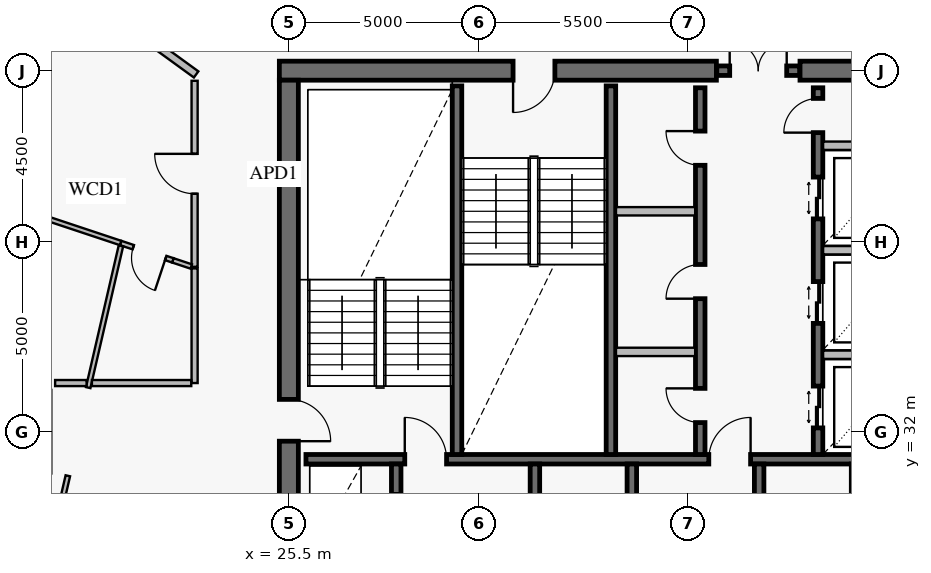
"""IFC4 building model, lengths in metres.
Left out: names, types, materials, properties, quantities, classifications, styles, units other than length and angle.
Written with IfcOpenShell. Run it as: python <this file> out.ifc"""

import sys

from ifc_helpers import new_model, si_unit, direction, frame, frame_2d, origin, place, context, subcontext, project, spatial, rectangle, extrude, element, fill, save


model = new_model("IFC4")
c1 = context("Model", 3, precision=1e-05, world=origin(), true_north=direction((0.0, 1.0)))
c2 = subcontext(c1, "Body", "Model", "MODEL_VIEW")
j1 = project(units=[si_unit("LENGTHUNIT", "METRE"), si_unit("PLANEANGLEUNIT", "RADIAN")], contexts=[c1])
p1 = place(None, origin())
s1 = spatial("IfcSite", under=j1, at=p1, CompositionType="ELEMENT")
p2 = place(p1, origin())
s2 = spatial("IfcBuilding", under=s1, at=p2, CompositionType="ELEMENT")
p3 = place(p2, frame((0.0, 0.0, 308.2)))
s3 = spatial("IfcBuildingStorey", under=s2, at=p3, CompositionType="ELEMENT", Elevation=308.2)
p4 = place(p3, frame((46.75, 41.5, 0.0), z_axis=(0.0, 0.0, 1.0), x_axis=(-1.0, 0.0, 0.0)))
e1 = element("IfcWall", 1, at=p4, inside=s3, PredefinedType="SHEAR", context=c2, shape_type="SweptSolid", body=[
    extrude(rectangle(XDim=7.8, YDim=0.5, at=frame_2d((3.9, 0.0))), origin(), (0.0, 0.0, 1.0), 3.8),
])
p5 = place(p3, frame((36.75, 41.5, 0.0), z_axis=(0.0, 0.0, 1.0), x_axis=(-1.0, 0.0, 0.0)))
e2 = element("IfcWall", 2, at=p5, inside=s3, PredefinedType="SHEAR", context=c2, shape_type="SweptSolid", body=[
    extrude(rectangle(XDim=11.5, YDim=0.5, at=frame_2d((5.75, 0.0))), origin(), (0.0, 0.0, 1.0), 3.8),
])
p6 = place(p5, frame((4.25, 0.0, 0.0)))
e3 = element("IfcOpeningElement", 3, at=p6, cuts=e2, PredefinedType="OPENING", context=c2, shape_type="SweptSolid", body=[
    extrude(rectangle(XDim=1.1, YDim=2.15, at=frame_2d((0.55, 1.075))), frame((0.0, 0.262, 0.0), z_axis=(0.0, -1.0, 0.0), x_axis=(1.0, 0.0, 0.0)), (0.0, 0.0, 1.0), 0.524),
])
p7 = place(p3, frame((25.5, 22.75, 0.0), z_axis=(0.0, 0.0, 1.0), x_axis=(0.0, 1.0, 0.0)))
e4 = element("IfcWall", 4, at=p7, inside=s3, PredefinedType="SHEAR", context=c2, shape_type="SweptSolid", body=[
    extrude(rectangle(XDim=18.5, YDim=0.5, at=frame_2d((9.25, 0.0))), origin(), (0.0, 0.0, 1.0), 3.8),
])
p8 = place(p7, frame((9.0, 0.0, 0.0)))
e5 = element("IfcOpeningElement", 5, at=p8, cuts=e4, PredefinedType="OPENING", context=c2, shape_type="SweptSolid", body=[
    extrude(rectangle(XDim=1.1, YDim=2.15, at=frame_2d((0.55, 1.075))), frame((0.0, 0.262, 0.0), z_axis=(0.0, -1.0, 0.0), x_axis=(1.0, 0.0, 0.0)), (0.0, 0.0, 1.0), 0.524),
])
p9 = place(p3, frame((36.76, 41.5, 0.0), z_axis=(0.0, 0.0, 1.0), x_axis=(1.0, 0.0, 0.0)))
e6 = element("IfcWall", 6, at=p9, inside=s3, PredefinedType="SOLIDWALL", context=c2, shape_type="SweptSolid", body=[
    extrude(rectangle(XDim=2.18, YDim=0.25, at=frame_2d((1.09, 0.0))), origin(), (0.0, 0.0, 1.0), 3.8),
])
p10 = place(p9, frame((0.34, 0.0, 0.0)))
e7 = element("IfcOpeningElement", 7, at=p10, cuts=e6, PredefinedType="OPENING", context=c2, shape_type="SweptSolid", body=[
    extrude(rectangle(XDim=1.5, YDim=2.15, at=frame_2d((0.75, 1.075))), frame((0.0, 0.137, 0.0), z_axis=(0.0, -1.0, 0.0), x_axis=(1.0, 0.0, 0.0)), (0.0, 0.0, 1.0), 0.274),
])
p11 = place(p3, frame((25.95, 31.275, 0.0), z_axis=(0.0, 0.0, 1.0), x_axis=(1.0, 0.0, 0.0)))
e8 = element("IfcWall", 8, at=p11, inside=s3, PredefinedType="SOLIDWALL", context=c2, shape_type="SweptSolid", body=[
    extrude(rectangle(XDim=20.1, YDim=0.25, at=frame_2d((10.05, 0.0))), origin(), (0.0, 0.0, 1.0), 3.8),
])
p12 = place(p11, frame((2.6, 0.0, 0.0)))
e9 = element("IfcOpeningElement", 9, at=p12, cuts=e8, PredefinedType="OPENING", context=c2, shape_type="SweptSolid", body=[
    extrude(rectangle(XDim=1.1, YDim=2.15, at=frame_2d((0.55, 1.075))), frame((0.0, 0.137, 0.0), z_axis=(0.0, -1.0, 0.0), x_axis=(1.0, 0.0, 0.0)), (0.0, 0.0, 1.0), 0.274),
])
p13 = place(p11, frame((10.6, 0.0, 0.0)))
e10 = element("IfcOpeningElement", 10, at=p13, cuts=e8, PredefinedType="OPENING", context=c2, shape_type="SweptSolid", body=[
    extrude(rectangle(XDim=1.1, YDim=2.15, at=frame_2d((0.55, 1.075))), frame((0.0, 0.137, 0.0), z_axis=(0.0, -1.0, 0.0), x_axis=(1.0, 0.0, 0.0)), (0.0, 0.0, 1.0), 0.274),
])
p14 = place(p11, frame((16.35, 0.0, 0.0)))
e11 = element("IfcOpeningElement", 11, at=p14, cuts=e8, PredefinedType="OPENING", context=c2, shape_type="SweptSolid", body=[
    extrude(rectangle(XDim=1.1, YDim=2.15, at=frame_2d((0.55, 1.075))), frame((0.0, 0.137, 0.0), z_axis=(0.0, -1.0, 0.0), x_axis=(1.0, 0.0, 0.0)), (0.0, 0.0, 1.0), 0.274),
])
for number, where, z_axis, x_axis in (
    (12, (29.925, 31.4, 0.0), (0.0, 0.0, 1.0), (0.0, 1.0, 0.0)),
    (13, (33.975, 31.4, 0.0), (0.0, 0.0, 1.0), (0.0, 1.0, 0.0)),
):
    element("IfcWall", number, at=place(p3, frame(where, z_axis=z_axis, x_axis=x_axis)), inside=s3, PredefinedType="SOLIDWALL", context=c2, shape_type="SweptSolid", body=[
        extrude(rectangle(XDim=9.7, YDim=0.25, at=frame_2d((4.85, 0.0))), origin(), (0.0, 0.0, 1.0), 3.8),
    ])
p15 = place(p3, frame((36.325, 31.4, 0.0), z_axis=(0.0, 0.0, 1.0), x_axis=(0.0, 1.0, 0.0)))
e14 = element("IfcWall", 14, at=p15, inside=s3, PredefinedType="SOLIDWALL", context=c2, shape_type="SweptSolid", body=[
    extrude(rectangle(XDim=9.65, YDim=0.25, at=frame_2d((4.825, 0.0))), origin(), (0.0, 0.0, 1.0), 3.8),
])
p16 = place(p15, frame((0.84, 0.0, 0.0)))
e15 = element("IfcOpeningElement", 15, at=p16, cuts=e14, PredefinedType="OPENING", context=c2, shape_type="SweptSolid", body=[
    extrude(rectangle(XDim=0.9, YDim=2.1, at=frame_2d((0.45, 1.05))), frame((0.0, 0.137, 0.0), z_axis=(0.0, -1.0, 0.0), x_axis=(1.0, 0.0, 0.0)), (0.0, 0.0, 1.0), 0.274),
])
p17 = place(p15, frame((4.1, 0.0, 0.0)))
e16 = element("IfcOpeningElement", 16, at=p17, cuts=e14, PredefinedType="OPENING", context=c2, shape_type="SweptSolid", body=[
    extrude(rectangle(XDim=0.9, YDim=2.1, at=frame_2d((0.45, 1.05))), frame((0.0, 0.137, 0.0), z_axis=(0.0, -1.0, 0.0), x_axis=(1.0, 0.0, 0.0)), (0.0, 0.0, 1.0), 0.274),
])
p18 = place(p15, frame((7.61, 0.0, 0.0)))
e17 = element("IfcOpeningElement", 17, at=p18, cuts=e14, PredefinedType="OPENING", context=c2, shape_type="SweptSolid", body=[
    extrude(rectangle(XDim=0.9, YDim=2.1, at=frame_2d((0.45, 1.05))), frame((0.0, 0.137, 0.0), z_axis=(0.0, -1.0, 0.0), x_axis=(1.0, 0.0, 0.0)), (0.0, 0.0, 1.0), 0.274),
])
p19 = place(p3, frame((39.425, 31.4, 0.0), z_axis=(0.0, 0.0, 1.0), x_axis=(0.0, 1.0, 0.0)))
e18 = element("IfcWall", 18, at=p19, inside=s3, PredefinedType="SOLIDWALL", context=c2, shape_type="SweptSolid", body=[
    extrude(rectangle(XDim=9.65, YDim=0.25, at=frame_2d((4.825, 0.0))), origin(), (0.0, 0.0, 1.0), 3.8),
])
p20 = place(p19, frame((0.7, 0.0, 0.0)))
e19 = element("IfcOpeningElement", 19, at=p20, cuts=e18, PredefinedType="OPENING", context=c2, shape_type="SweptSolid", body=[
    extrude(rectangle(XDim=1.1, YDim=2.2, at=frame_2d((0.55, 1.1))), frame((0.0, 0.137, 0.0), z_axis=(0.0, -1.0, 0.0), x_axis=(1.0, 0.0, 0.0)), (0.0, 0.0, 1.0), 0.274),
])
p21 = place(p19, frame((3.45, 0.0, 0.0)))
e20 = element("IfcOpeningElement", 20, at=p21, cuts=e18, PredefinedType="OPENING", context=c2, shape_type="SweptSolid", body=[
    extrude(rectangle(XDim=1.1, YDim=2.2, at=frame_2d((0.55, 1.1))), frame((0.0, 0.137, 0.0), z_axis=(0.0, -1.0, 0.0), x_axis=(1.0, 0.0, 0.0)), (0.0, 0.0, 1.0), 0.274),
])
p22 = place(p19, frame((6.2, 0.0, 0.0)))
e21 = element("IfcOpeningElement", 21, at=p22, cuts=e18, PredefinedType="OPENING", context=c2, shape_type="SweptSolid", body=[
    extrude(rectangle(XDim=1.1, YDim=2.2, at=frame_2d((0.55, 1.1))), frame((0.0, 0.137, 0.0), z_axis=(0.0, -1.0, 0.0), x_axis=(1.0, 0.0, 0.0)), (0.0, 0.0, 1.0), 0.274),
])
p23 = place(p19, frame((8.47, 0.0, 0.0)))
e22 = element("IfcOpeningElement", 22, at=p23, cuts=e18, PredefinedType="OPENING", context=c2, shape_type="SweptSolid", body=[
    extrude(rectangle(XDim=0.9, YDim=2.1, at=frame_2d((0.45, 1.05))), frame((0.0, 0.137, 0.0), z_axis=(0.0, -1.0, 0.0), x_axis=(1.0, 0.0, 0.0)), (0.0, 0.0, 1.0), 0.274),
])
p24 = place(p3, frame((28.325, 22.95, 0.0), z_axis=(0.0, 0.0, 1.0), x_axis=(0.0, 1.0, 0.0)))
e23 = element("IfcWall", 23, at=p24, inside=s3, PredefinedType="SOLIDWALL", context=c2, shape_type="SweptSolid", body=[
    extrude(rectangle(XDim=8.2, YDim=0.25, at=frame_2d((4.1, 0.0))), origin(), (0.0, 0.0, 1.0), 3.8),
])
p25 = place(p24, frame((0.75, 0.0, 0.0)))
e24 = element("IfcOpeningElement", 24, at=p25, cuts=e23, PredefinedType="OPENING", context=c2, shape_type="SweptSolid", body=[
    extrude(rectangle(XDim=1.3, YDim=2.3, at=frame_2d((0.65, 1.15))), frame((0.0, 0.137, 0.0), z_axis=(0.0, -1.0, 0.0), x_axis=(1.0, 0.0, 0.0)), (0.0, 0.0, 1.0), 0.274),
])
p26 = place(p24, frame((3.78, 0.0, 0.0)))
e25 = element("IfcOpeningElement", 25, at=p26, cuts=e23, PredefinedType="OPENING", context=c2, shape_type="SweptSolid", body=[
    extrude(rectangle(XDim=0.9, YDim=2.1, at=frame_2d((0.45, 1.05))), frame((0.0, 0.137, 0.0), z_axis=(0.0, -1.0, 0.0), x_axis=(1.0, 0.0, 0.0)), (0.0, 0.0, 1.0), 0.274),
])
p27 = place(p24, frame((6.5, 0.0, 0.0)))
e26 = element("IfcOpeningElement", 26, at=p27, cuts=e23, PredefinedType="OPENING", context=c2, shape_type="SweptSolid", body=[
    extrude(rectangle(XDim=0.9, YDim=2.1, at=frame_2d((0.45, 1.05))), frame((0.0, 0.137, 0.0), z_axis=(0.0, -1.0, 0.0), x_axis=(1.0, 0.0, 0.0)), (0.0, 0.0, 1.0), 0.274),
])
p28 = place(p3, frame((31.975, 22.95, 0.0), z_axis=(0.0, 0.0, 1.0), x_axis=(0.0, 1.0, 0.0)))
e27 = element("IfcWall", 27, at=p28, inside=s3, PredefinedType="SOLIDWALL", context=c2, shape_type="SweptSolid", body=[
    extrude(rectangle(XDim=8.2, YDim=0.25, at=frame_2d((4.1, 0.0))), origin(), (0.0, 0.0, 1.0), 3.8),
])
p29 = place(p3, frame((34.525, 22.95, 0.0), z_axis=(0.0, 0.0, 1.0), x_axis=(0.0, 1.0, 0.0)))
e28 = element("IfcWall", 28, at=p29, inside=s3, PredefinedType="SOLIDWALL", context=c2, shape_type="SweptSolid", body=[
    extrude(rectangle(XDim=8.2, YDim=0.25, at=frame_2d((4.1, 0.0))), origin(), (0.0, 0.0, 1.0), 3.8),
])
p30 = place(p29, frame((2.1, 0.0, 0.0)))
e29 = element("IfcOpeningElement", 29, at=p30, cuts=e28, PredefinedType="OPENING", context=c2, shape_type="SweptSolid", body=[
    extrude(rectangle(XDim=0.9, YDim=2.1, at=frame_2d((0.45, 1.05))), frame((0.0, 0.137, 0.0), z_axis=(0.0, -1.0, 0.0), x_axis=(1.0, 0.0, 0.0)), (0.0, 0.0, 1.0), 0.274),
])
p31 = place(p29, frame((6.3, 0.0, 0.0)))
e30 = element("IfcOpeningElement", 30, at=p31, cuts=e28, PredefinedType="OPENING", context=c2, shape_type="SweptSolid", body=[
    extrude(rectangle(XDim=0.9, YDim=2.1, at=frame_2d((0.45, 1.05))), frame((0.0, 0.137, 0.0), z_axis=(0.0, -1.0, 0.0), x_axis=(1.0, 0.0, 0.0)), (0.0, 0.0, 1.0), 0.274),
])
p32 = place(p3, frame((37.875, 22.95, 0.0), z_axis=(0.0, 0.0, 1.0), x_axis=(0.0, 1.0, 0.0)))
e31 = element("IfcWall", 31, at=p32, inside=s3, PredefinedType="SOLIDWALL", context=c2, shape_type="SweptSolid", body=[
    extrude(rectangle(XDim=8.2, YDim=0.25, at=frame_2d((4.1, 0.0))), origin(), (0.0, 0.0, 1.0), 3.8),
])
p33 = place(p32, frame((2.012, 0.0, 0.0)))
e32 = element("IfcOpeningElement", 32, at=p33, cuts=e31, PredefinedType="OPENING", context=c2, shape_type="SweptSolid", body=[
    extrude(rectangle(XDim=0.9, YDim=2.1, at=frame_2d((0.45, 1.05))), frame((0.0, 0.137, 0.0), z_axis=(0.0, -1.0, 0.0), x_axis=(1.0, 0.0, 0.0)), (0.0, 0.0, 1.0), 0.274),
])
p34 = place(p32, frame((6.212, 0.0, 0.0)))
e33 = element("IfcOpeningElement", 33, at=p34, cuts=e31, PredefinedType="OPENING", context=c2, shape_type="SweptSolid", body=[
    extrude(rectangle(XDim=0.9, YDim=2.1, at=frame_2d((0.45, 1.05))), frame((0.0, 0.137, 0.0), z_axis=(0.0, -1.0, 0.0), x_axis=(1.0, 0.0, 0.0)), (0.0, 0.0, 1.0), 0.274),
])
p35 = place(p3, frame((22.45, 36.508, 0.0), z_axis=(0.0, 0.0, 1.0), x_axis=(-0.94886823131, 0.315672424532, 0.0)))
e34 = element("IfcWall", 34, at=p35, inside=s3, PredefinedType="PARTITIONING", context=c2, shape_type="SweptSolid", body=[
    extrude(rectangle(XDim=1.451, YDim=0.12, at=frame_2d((0.726, 0.0))), origin(), (0.0, 0.0, 1.0), 3.55),
])
p36 = place(p35, frame((0.2, 0.0, 0.0)))
e35 = element("IfcOpeningElement", 35, at=p36, cuts=e34, PredefinedType="OPENING", context=c2, shape_type="SweptSolid", body=[
    extrude(rectangle(XDim=0.9, YDim=2.1, at=frame_2d((0.45, 1.05))), frame((0.0, 0.072, 0.0), z_axis=(0.0, -1.0, 0.0), x_axis=(1.0, 0.0, 0.0)), (0.0, 0.0, 1.0), 0.144),
])
p37 = place(p3, frame((21.073, 36.966, 0.0), z_axis=(0.0, 0.0, 1.0), x_axis=(-0.948883822728, 0.315625554995, 0.0)))
e36 = element("IfcWall", 36, at=p37, inside=s3, PredefinedType="PARTITIONING", context=c2, shape_type="SweptSolid", body=[
    extrude(rectangle(XDim=7.785, YDim=0.12, at=frame_2d((3.892, 0.0))), origin(), (0.0, 0.0, 1.0), 2.97),
])
p38 = place(p37, frame((3.392, 0.0, 0.0)))
e37 = element("IfcOpeningElement", 37, at=p38, cuts=e36, PredefinedType="OPENING", context=c2, shape_type="SweptSolid", body=[
    extrude(rectangle(XDim=0.95, YDim=2.1, at=frame_2d((0.475, 1.05))), frame((0.0, 0.072, 0.0), z_axis=(0.0, -1.0, 0.0), x_axis=(1.0, 0.0, 0.0)), (0.0, 0.0, 1.0), 0.144),
])
p39 = place(p3, frame((23.02, 41.234, 0.0), z_axis=(0.0, 0.0, 1.0), x_axis=(0.0, -1.0, 0.0)))
e38 = element("IfcWall", 38, at=p39, inside=s3, PredefinedType="PARTITIONING", context=c2, shape_type="SweptSolid", body=[
    extrude(rectangle(XDim=4.895, YDim=0.16, at=frame_2d((2.448, 0.0))), origin(), (0.0, 0.0, 1.0), 3.55),
])
p40 = place(p39, frame((1.923, 0.0, 0.0)))
e39 = element("IfcOpeningElement", 39, at=p40, cuts=e38, PredefinedType="OPENING", context=c2, shape_type="SweptSolid", body=[
    extrude(rectangle(XDim=1.05, YDim=2.15, at=frame_2d((0.525, 1.075))), frame((0.0, 0.092, 0.0), z_axis=(0.0, -1.0, 0.0), x_axis=(1.0, 0.0, 0.0)), (0.0, 0.0, 1.0), 0.184),
])
for number, where, z_axis, x_axis in (
    (40, (34.108, 34.1, 0.0), (0.0, 0.0, 1.0), (1.0, 0.0, 0.0)),
    (41, (34.108, 37.8, 0.0), (0.0, 0.0, 1.0), (1.0, 0.0, 0.0)),
):
    element("IfcWall", number, at=place(p3, frame(where, z_axis=z_axis, x_axis=x_axis)), inside=s3, PredefinedType="PARTITIONING", context=c2, shape_type="SweptSolid", body=[
        extrude(rectangle(XDim=2.084, YDim=0.22, at=frame_2d((1.042, 0.0))), origin(), (0.0, 0.0, 1.0), 3.55),
    ])
for number, where, z_axis, x_axis in (
    (42, (39.558, 34.025, 0.0), (0.0, 0.0, 1.0), (1.0, 0.0, 0.0)),
    (43, (39.558, 36.775, 0.0), (0.0, 0.0, 1.0), (1.0, 0.0, 0.0)),
    (44, (39.558, 39.525, 0.0), (0.0, 0.0, 1.0), (1.0, 0.0, 0.0)),
):
    element("IfcWall", number, at=place(p3, frame(where, z_axis=z_axis, x_axis=x_axis)), inside=s3, PredefinedType="PARTITIONING", context=c2, shape_type="SweptSolid", body=[
        extrude(rectangle(XDim=2.384, YDim=0.22, at=frame_2d((1.192, 0.0))), origin(), (0.0, 0.0, 1.0), 3.55),
    ])
p41 = place(p3, frame((23.06, 41.402, 0.0), z_axis=(0.0, 0.0, 1.0), x_axis=(-0.80902654106, 0.587772112184, 0.0)))
e45 = element("IfcWall", 45, at=p41, inside=s3, PredefinedType="PARTITIONING", context=c2, shape_type="SweptSolid", body=[
    extrude(rectangle(XDim=8.212, YDim=0.2, at=frame_2d((4.106, 0.0))), origin(), (0.0, 0.0, 1.0), 2.97),
])
p42 = place(p3, frame((22.932, 36.347, 0.0), z_axis=(0.0, 0.0, 1.0), x_axis=(-0.948827398112, 0.315795137062, 0.0)))
e46 = element("IfcWall", 46, at=p42, inside=s3, PredefinedType="PARTITIONING", context=c2, shape_type="SweptSolid", body=[
    extrude(rectangle(XDim=0.508, YDim=0.12, at=frame_2d((0.254, 0.0))), origin(), (0.0, 0.0, 1.0), 3.55),
])
p43 = place(p3, frame((21.082, 36.891, 0.0), z_axis=(0.0, 0.0, 1.0), x_axis=(-0.224929350613, -0.974375075232, 0.0)))
e47 = element("IfcWall", 47, at=p43, inside=s3, PredefinedType="PARTITIONING", context=c2, shape_type="SweptSolid", body=[
    extrude(rectangle(XDim=3.829, YDim=0.12, at=frame_2d((1.915, 0.0))), origin(), (0.0, 0.0, 1.0), 3.0),
])
p44 = place(p3, frame((19.685, 30.84, 0.0), z_axis=(0.0, 0.0, 1.0), x_axis=(-0.22491945774, -0.974377358896, 0.0)))
e48 = element("IfcWall", 48, at=p44, inside=s3, PredefinedType="PARTITIONING", context=c2, shape_type="SweptSolid", body=[
    extrude(rectangle(XDim=1.784, YDim=0.12, at=frame_2d((0.892, 0.0))), origin(), (0.0, 0.0, 1.0), 3.55),
])
p45 = place(p3, frame((23.02, 36.297, 0.0), z_axis=(0.0, 0.0, 1.0), x_axis=(0.0, -1.0, 0.0)))
e49 = element("IfcWall", 49, at=p45, inside=s3, PredefinedType="PARTITIONING", context=c2, shape_type="SweptSolid", body=[
    extrude(rectangle(XDim=3.017, YDim=0.16, at=frame_2d((1.508, 0.0))), origin(), (0.0, 0.0, 1.0), 3.0),
])
p46 = place(p3, frame((22.932, 33.28, 0.0), z_axis=(0.0, 0.0, 1.0), x_axis=(-1.0, 0.0, 0.0)))
e50 = element("IfcWall", 50, at=p46, inside=s3, PredefinedType="PARTITIONING", context=c2, shape_type="SweptSolid", body=[
    extrude(rectangle(XDim=2.614, YDim=0.16, at=frame_2d((1.307, 0.0))), origin(), (0.0, 0.0, 1.0), 3.55),
])
p47 = place(p3, frame((20.178, 33.28, 0.0), z_axis=(0.0, 0.0, 1.0), x_axis=(-1.0, 0.0, 0.0)))
e51 = element("IfcWall", 51, at=p47, inside=s3, PredefinedType="PARTITIONING", context=c2, shape_type="SweptSolid", body=[
    extrude(rectangle(XDim=0.828, YDim=0.16, at=frame_2d((0.414, 0.0))), origin(), (0.0, 0.0, 1.0), 3.55),
])
p48 = place(p8, frame((1.1, 0.0, 0.0), z_axis=(0.0, 0.0, 1.0), x_axis=(-1.0, 0.0, 0.0)))
e52 = element("IfcDoor", 52, at=p48, inside=s3, OperationType="SINGLE_SWING_RIGHT", PredefinedType="USERDEFINED", context=c2, shape_type="SweptSolid", body=[
    extrude(rectangle(XDim=1.1, YDim=2.15, at=frame_2d((0.55, 1.075))), frame((0.0, 0.025, 0.0), z_axis=(0.0, -1.0, 0.0), x_axis=(1.0, 0.0, 0.0)), (0.0, 0.0, 1.0), 0.05),
])
fill(e5, e52)
p49 = place(p6, origin())
e53 = element("IfcDoor", 53, at=p49, inside=s3, OperationType="SINGLE_SWING_RIGHT", PredefinedType="USERDEFINED", context=c2, shape_type="SweptSolid", body=[
    extrude(rectangle(XDim=1.1, YDim=2.15, at=frame_2d((0.55, 1.075))), frame((0.0, 0.025, 0.0), z_axis=(0.0, -1.0, 0.0), x_axis=(1.0, 0.0, 0.0)), (0.0, 0.0, 1.0), 0.05),
])
fill(e3, e53)
p50 = place(p10, origin())
e54 = element("IfcDoor", 54, at=p50, inside=s3, OperationType="DOUBLE_DOOR_SINGLE_SWING", PredefinedType="DOOR", context=c2, shape_type="SweptSolid", body=[
    extrude(rectangle(XDim=1.5, YDim=2.15, at=frame_2d((0.75, 1.075))), frame((0.0, 0.025, 0.0), z_axis=(0.0, -1.0, 0.0), x_axis=(1.0, 0.0, 0.0)), (0.0, 0.0, 1.0), 0.05),
])
fill(e7, e54)
p51 = place(p12, origin())
e55 = element("IfcDoor", 55, at=p51, inside=s3, OperationType="SINGLE_SWING_LEFT", PredefinedType="USERDEFINED", context=c2, shape_type="SweptSolid", body=[
    extrude(rectangle(XDim=1.1, YDim=2.15, at=frame_2d((0.55, 1.075))), frame((0.0, 0.025, 0.0), z_axis=(0.0, -1.0, 0.0), x_axis=(1.0, 0.0, 0.0)), (0.0, 0.0, 1.0), 0.05),
])
fill(e9, e55)
p52 = place(p13, origin())
e56 = element("IfcDoor", 56, at=p52, inside=s3, OperationType="SINGLE_SWING_RIGHT", PredefinedType="USERDEFINED", context=c2, shape_type="SweptSolid", body=[
    extrude(rectangle(XDim=1.1, YDim=2.15, at=frame_2d((0.55, 1.075))), frame((0.0, 0.025, 0.0), z_axis=(0.0, -1.0, 0.0), x_axis=(1.0, 0.0, 0.0)), (0.0, 0.0, 1.0), 0.05),
])
fill(e10, e56)
p53 = place(p16, origin())
e57 = element("IfcDoor", 57, at=p53, inside=s3, OperationType="SINGLE_SWING_RIGHT", PredefinedType="DOOR", context=c2, shape_type="SweptSolid", body=[
    extrude(rectangle(XDim=0.9, YDim=2.1, at=frame_2d((0.45, 1.05))), frame((0.0, 0.025, 0.0), z_axis=(0.0, -1.0, 0.0), x_axis=(1.0, 0.0, 0.0)), (0.0, 0.0, 1.0), 0.05),
])
fill(e15, e57)
p54 = place(p17, origin())
e58 = element("IfcDoor", 58, at=p54, inside=s3, OperationType="SINGLE_SWING_LEFT", PredefinedType="DOOR", context=c2, shape_type="SweptSolid", body=[
    extrude(rectangle(XDim=0.9, YDim=2.1, at=frame_2d((0.45, 1.05))), frame((0.0, 0.025, 0.0), z_axis=(0.0, -1.0, 0.0), x_axis=(1.0, 0.0, 0.0)), (0.0, 0.0, 1.0), 0.05),
])
fill(e16, e58)
p55 = place(p18, origin())
e59 = element("IfcDoor", 59, at=p55, inside=s3, OperationType="SINGLE_SWING_RIGHT", PredefinedType="DOOR", context=c2, shape_type="SweptSolid", body=[
    extrude(rectangle(XDim=0.9, YDim=2.1, at=frame_2d((0.45, 1.05))), frame((0.0, 0.025, 0.0), z_axis=(0.0, -1.0, 0.0), x_axis=(1.0, 0.0, 0.0)), (0.0, 0.0, 1.0), 0.05),
])
fill(e17, e59)
p56 = place(p20, origin())
e60 = element("IfcDoor", 60, at=p56, inside=s3, OperationType="DOUBLE_DOOR_SLIDING", PredefinedType="DOOR", context=c2, shape_type="SweptSolid", body=[
    extrude(rectangle(XDim=1.1, YDim=2.2, at=frame_2d((0.55, 1.1))), frame((0.0, 0.025, 0.0), z_axis=(0.0, -1.0, 0.0), x_axis=(1.0, 0.0, 0.0)), (0.0, 0.0, 1.0), 0.05),
])
fill(e19, e60)
p57 = place(p21, origin())
e61 = element("IfcDoor", 61, at=p57, inside=s3, OperationType="DOUBLE_DOOR_SLIDING", PredefinedType="DOOR", context=c2, shape_type="SweptSolid", body=[
    extrude(rectangle(XDim=1.1, YDim=2.2, at=frame_2d((0.55, 1.1))), frame((0.0, 0.025, 0.0), z_axis=(0.0, -1.0, 0.0), x_axis=(1.0, 0.0, 0.0)), (0.0, 0.0, 1.0), 0.05),
])
fill(e20, e61)
p58 = place(p22, origin())
e62 = element("IfcDoor", 62, at=p58, inside=s3, OperationType="DOUBLE_DOOR_SLIDING", PredefinedType="DOOR", context=c2, shape_type="SweptSolid", body=[
    extrude(rectangle(XDim=1.1, YDim=2.2, at=frame_2d((0.55, 1.1))), frame((0.0, 0.025, 0.0), z_axis=(0.0, -1.0, 0.0), x_axis=(1.0, 0.0, 0.0)), (0.0, 0.0, 1.0), 0.05),
])
fill(e21, e62)
p59 = place(p23, origin())
e63 = element("IfcDoor", 63, at=p59, inside=s3, OperationType="SINGLE_SWING_LEFT", PredefinedType="DOOR", context=c2, shape_type="SweptSolid", body=[
    extrude(rectangle(XDim=0.9, YDim=2.1, at=frame_2d((0.45, 1.05))), frame((0.0, 0.025, 0.0), z_axis=(0.0, -1.0, 0.0), x_axis=(1.0, 0.0, 0.0)), (0.0, 0.0, 1.0), 0.05),
])
fill(e22, e63)
p60 = place(p36, origin())
e64 = element("IfcDoor", 64, at=p60, inside=s3, OperationType="SINGLE_SWING_LEFT", PredefinedType="DOOR", context=c2, shape_type="SweptSolid", body=[
    extrude(rectangle(XDim=0.9, YDim=2.1, at=frame_2d((0.45, 1.05))), frame((0.0, 0.025, 0.0), z_axis=(0.0, -1.0, 0.0), x_axis=(1.0, 0.0, 0.0)), (0.0, 0.0, 1.0), 0.05),
])
fill(e35, e64)
p61 = place(p40, frame((1.05, 0.0, 0.0), z_axis=(0.0, 0.0, 1.0), x_axis=(-1.0, 0.0, 0.0)))
e65 = element("IfcDoor", 65, at=p61, inside=s3, OperationType="SINGLE_SWING_RIGHT", PredefinedType="DOOR", context=c2, shape_type="SweptSolid", body=[
    extrude(rectangle(XDim=1.05, YDim=2.15, at=frame_2d((0.525, 1.075))), frame((0.0, 0.025, 0.0), z_axis=(0.0, -1.0, 0.0), x_axis=(1.0, 0.0, 0.0)), (0.0, 0.0, 1.0), 0.05),
])
fill(e39, e65)
save(model, sys.argv[1])
